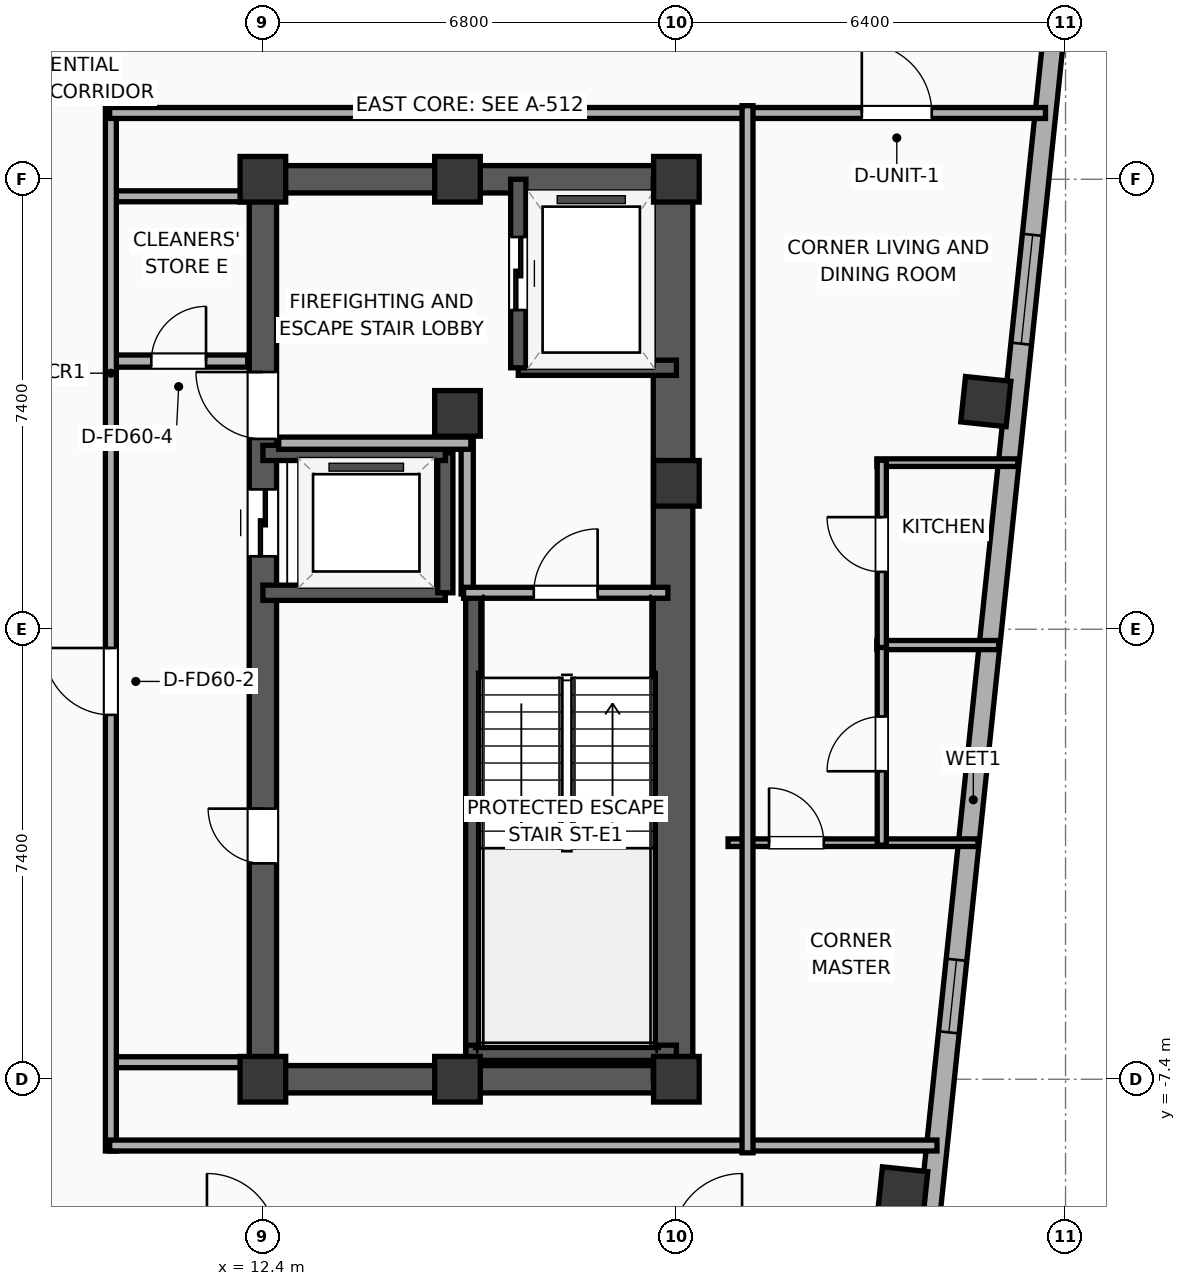
"""IFC4 building model, lengths in metres.
Left out: names, types, materials, properties, quantities, classifications, styles, units other than length and angle.
Written with IfcOpenShell. Run it as: python <this file> out.ifc"""

import sys

from ifc_helpers import new_model, si_unit, direction, frame, frame_2d, origin, origin_2d, place, context, subcontext, project, spatial, rectangle, hollow_rectangle, extrude, element, fill, save


model = new_model("IFC4")
c1 = context("Model", 3, precision=1e-05, world=origin(), true_north=direction((0.0, 1.0)))
c2 = subcontext(c1, "Body", "Model", "MODEL_VIEW")
j1 = project(units=[si_unit("LENGTHUNIT", "METRE"), si_unit("PLANEANGLEUNIT", "RADIAN")], contexts=[c1])
p1 = place(None, origin())
s1 = spatial("IfcSite", under=j1, at=p1, CompositionType="ELEMENT")
p2 = place(p1, origin())
s2 = spatial("IfcBuilding", under=s1, at=p2, CompositionType="ELEMENT")
p3 = place(p2, frame((0.0, 0.0, 260.0)))
s3 = spatial("IfcBuildingStorey", under=s2, at=p3, CompositionType="ELEMENT", Elevation=260.0)
for number, where, z_axis, x_axis in (
    (1, (12.4, -7.4, 0.0), (0.0, 0.0, 1.0), (1.0, 0.0, 0.0)),
    (2, (15.6, 3.55, 0.0), (0.0, 0.0, 1.0), (1.0, 0.0, 0.0)),
    (3, (12.4, 7.4, 0.0), (0.0, 0.0, 1.0), (1.0, 0.0, 0.0)),
    (4, (15.6, -7.4, 0.0), (0.0, 0.0, 1.0), (1.0, 0.0, 0.0)),
    (5, (15.6, 7.4, 0.0), (0.0, 0.0, 1.0), (1.0, 0.0, 0.0)),
    (6, (19.2, -7.4, 0.0), (0.0, 0.0, 1.0), (1.0, 0.0, 0.0)),
    (7, (19.2, 2.4, 0.0), (0.0, 0.0, 1.0), (1.0, 0.0, 0.0)),
    (8, (19.2, 7.4, 0.0), (0.0, 0.0, 1.0), (1.0, 0.0, 0.0)),
):
    element("IfcColumn", number, at=place(p3, frame(where, z_axis=z_axis, x_axis=x_axis)), inside=s3, PredefinedType="COLUMN", context=c2, shape_type="SweptSolid", body=[
        extrude(rectangle(XDim=0.75, YDim=0.75, at=origin_2d()), origin(), (0.0, 0.0, 1.0), 3.9),
    ])
for number, where, z_axis, x_axis in (
    (9, (12.175, -7.4, 0.0), (0.0, 0.0, 1.0), (1.0, 0.0, 0.0)),
    (10, (12.175, 7.4, 0.0), (0.0, 0.0, 1.0), (1.0, 0.0, 0.0)),
):
    element("IfcWall", number, at=place(p3, frame(where, z_axis=z_axis, x_axis=x_axis)), inside=s3, PredefinedType="SHEAR", context=c2, shape_type="SweptSolid", body=[
        extrude(rectangle(XDim=7.25, YDim=0.45, at=frame_2d((3.625, 0.0))), origin(), (0.0, 0.0, 1.0), 3.65),
    ])
p4 = place(p3, frame((12.4, -7.4, 0.0), z_axis=(0.0, 0.0, 1.0), x_axis=(0.0, 1.0, 0.0)))
e11 = element("IfcWall", 11, at=p4, inside=s3, PredefinedType="SHEAR", context=c2, shape_type="SweptSolid", body=[
    extrude(rectangle(XDim=14.8, YDim=0.45, at=frame_2d((7.4, 0.0))), origin(), (0.0, 0.0, 1.0), 3.65),
])
p5 = place(p4, frame((8.6, 0.0, 0.0)))
e12 = element("IfcOpeningElement", 12, at=p5, cuts=e11, PredefinedType="OPENING", context=c2, shape_type="SweptSolid", body=[
    extrude(rectangle(XDim=1.1, YDim=2.05, at=frame_2d((0.55, 1.025))), frame((0.0, 0.235, 0.0), z_axis=(0.0, -1.0, 0.0), x_axis=(1.0, 0.0, 0.0)), (0.0, 0.0, 1.0), 0.47),
])
p6 = place(p4, frame((10.53, 0.0, 0.0)))
e13 = element("IfcOpeningElement", 13, at=p6, cuts=e11, PredefinedType="OPENING", context=c2, shape_type="SweptSolid", body=[
    extrude(rectangle(XDim=1.1, YDim=2.05, at=frame_2d((0.55, 1.025))), frame((0.0, 0.235, 0.0), z_axis=(0.0, -1.0, 0.0), x_axis=(1.0, 0.0, 0.0)), (0.0, 0.0, 1.0), 0.47),
])
p7 = place(p4, frame((3.55, 0.0, 0.0)))
e14 = element("IfcOpeningElement", 14, at=p7, cuts=e11, PredefinedType="OPENING", context=c2, shape_type="SweptSolid", body=[
    extrude(rectangle(XDim=0.9, YDim=2.05, at=frame_2d((0.45, 1.025))), frame((0.0, 0.235, 0.0), z_axis=(0.0, -1.0, 0.0), x_axis=(1.0, 0.0, 0.0)), (0.0, 0.0, 1.0), 0.47),
])
p8 = place(p3, frame((19.145, -7.4, 0.0), z_axis=(0.0, 0.0, 1.0), x_axis=(0.0, 1.0, 0.0)))
e15 = element("IfcWall", 15, at=p8, inside=s3, PredefinedType="SHEAR", context=c2, shape_type="SweptSolid", body=[
    extrude(rectangle(XDim=14.8, YDim=0.65, at=frame_2d((7.4, 0.0))), origin(), (0.0, 0.0, 1.0), 3.65),
])
p9 = place(p3, frame((15.86, -7.085, 0.0), z_axis=(0.0, 0.0, 1.0), x_axis=(0.0, 1.0, 0.0)))
e16 = element("IfcWall", 16, at=p9, inside=s3, PredefinedType="SOLIDWALL", context=c2, shape_type="SweptSolid", body=[
    extrude(rectangle(XDim=7.685, YDim=0.25, at=frame_2d((3.843, 0.0))), origin(), (0.0, 0.0, 1.0), 3.65),
])
p10 = place(p3, frame((15.74, -6.965, 0.0), z_axis=(0.0, 0.0, 1.0), x_axis=(1.0, 0.0, 0.0)))
e17 = element("IfcWall", 17, at=p10, inside=s3, PredefinedType="SOLIDWALL", context=c2, shape_type="SweptSolid", body=[
    extrude(rectangle(XDim=3.46, YDim=0.25, at=frame_2d((1.73, 0.0))), origin(), (0.0, 0.0, 1.0), 3.65),
])
for number, where, z_axis, x_axis in (
    (18, (22.923, -9.252, 0.0), (0.0, 0.0, 1.0), (0.995, -0.105, 0.0)),
    (19, (24.289, 3.744, 0.0), (0.0, 0.0, 1.0), (0.995, -0.105, 0.0)),
):
    element("IfcColumn", number, at=place(p3, frame(where, z_axis=z_axis, x_axis=x_axis)), inside=s3, PredefinedType="COLUMN", context=c2, shape_type="SweptSolid", body=[
        extrude(hollow_rectangle(XDim=0.75, YDim=0.75, WallThickness=0.025, at=origin_2d()), origin(), (0.0, 0.0, 1.0), 3.9),
    ])
p11 = place(p3, frame((25.67, 12.296, 0.0), z_axis=(0.0, 0.0, 1.0), x_axis=(-0.104533282919, -0.994521388791, 0.0)))
e20 = element("IfcWall", 20, at=p11, inside=s3, PredefinedType="ELEMENTEDWALL", context=c2, shape_type="SweptSolid", body=[
    extrude(rectangle(XDim=30.366, YDim=0.34, at=frame_2d((15.183, 0.0))), origin(), (0.0, 0.0, 1.0), 2.54),
])
p12 = place(p11, frame((5.842, 0.0, 0.75)))
e21 = element("IfcOpeningElement", 21, at=p12, cuts=e20, PredefinedType="OPENING", context=c2, shape_type="SweptSolid", body=[
    extrude(rectangle(XDim=1.8, YDim=1.63, at=frame_2d((0.9, 0.815))), frame((0.0, 0.18, 0.0), z_axis=(0.0, -1.0, 0.0), x_axis=(1.0, 0.0, 0.0)), (0.0, 0.0, 1.0), 0.36),
])
p13 = place(p11, frame((23.525, 0.0, 0.75)))
e22 = element("IfcOpeningElement", 22, at=p13, cuts=e20, PredefinedType="OPENING", context=c2, shape_type="SweptSolid", body=[
    extrude(rectangle(XDim=1.8, YDim=1.63, at=frame_2d((0.9, 0.815))), frame((0.0, 0.18, 0.0), z_axis=(0.0, -1.0, 0.0), x_axis=(1.0, 0.0, 0.0)), (0.0, 0.0, 1.0), 0.36),
])
p14 = place(p11, frame((27.017, 0.0, 0.75)))
e23 = element("IfcOpeningElement", 23, at=p14, cuts=e20, PredefinedType="OPENING", context=c2, shape_type="SweptSolid", body=[
    extrude(rectangle(XDim=1.2, YDim=1.63, at=frame_2d((0.6, 0.815))), frame((0.0, 0.18, 0.0), z_axis=(0.0, -1.0, 0.0), x_axis=(1.0, 0.0, 0.0)), (0.0, 0.0, 1.0), 0.36),
])
p15 = place(p11, frame((17.829, 0.0, 0.75)))
e24 = element("IfcOpeningElement", 24, at=p15, cuts=e20, PredefinedType="OPENING", context=c2, shape_type="SweptSolid", body=[
    extrude(rectangle(XDim=1.2, YDim=1.63, at=frame_2d((0.6, 0.815))), frame((0.0, 0.18, 0.0), z_axis=(0.0, -1.0, 0.0), x_axis=(1.0, 0.0, 0.0)), (0.0, 0.0, 1.0), 0.36),
])
p16 = place(p3, frame((16.6, 4.3, 0.0), z_axis=(0.0, 0.0, 1.0), x_axis=(1.0, 0.0, 0.0)))
e25 = element("IfcWall", 25, at=p16, inside=s3, PredefinedType="SOLIDWALL", context=c2, shape_type="SweptSolid", body=[
    extrude(rectangle(XDim=2.6, YDim=0.25, at=frame_2d((1.3, 0.0))), origin(), (0.0, 0.0, 1.0), 3.65),
])
p17 = place(p3, frame((16.6, 7.4, 0.0), z_axis=(0.0, 0.0, 1.0), x_axis=(0.0, -1.0, 0.0)))
e26 = element("IfcWall", 26, at=p17, inside=s3, PredefinedType="SOLIDWALL", context=c2, shape_type="SweptSolid", body=[
    extrude(rectangle(XDim=3.1, YDim=0.25, at=frame_2d((1.55, 0.0))), origin(), (0.0, 0.0, 1.0), 3.65),
])
p18 = place(p17, frame((0.95, 0.0, 0.0)))
e27 = element("IfcOpeningElement", 27, at=p18, cuts=e26, PredefinedType="OPENING", context=c2, shape_type="SweptSolid", body=[
    extrude(rectangle(XDim=1.2, YDim=2.05, at=frame_2d((0.6, 1.025))), frame((0.0, 0.135, 0.0), z_axis=(0.0, -1.0, 0.0), x_axis=(1.0, 0.0, 0.0)), (0.0, 0.0, 1.0), 0.27),
])
p19 = place(p3, frame((12.4, 0.6, 0.0), z_axis=(0.0, 0.0, 1.0), x_axis=(1.0, 0.0, 0.0)))
e28 = element("IfcWall", 28, at=p19, inside=s3, PredefinedType="SOLIDWALL", context=c2, shape_type="SweptSolid", body=[
    extrude(rectangle(XDim=3.0, YDim=0.25, at=frame_2d((1.5, 0.0))), origin(), (0.0, 0.0, 1.0), 3.65),
])
p20 = place(p3, frame((15.4, 0.6, 0.0), z_axis=(0.0, 0.0, 1.0), x_axis=(0.0, 1.0, 0.0)))
e29 = element("IfcWall", 29, at=p20, inside=s3, PredefinedType="SOLIDWALL", context=c2, shape_type="SweptSolid", body=[
    extrude(rectangle(XDim=2.3, YDim=0.25, at=frame_2d((1.15, 0.0))), origin(), (0.0, 0.0, 1.0), 3.65),
])
p21 = place(p3, frame((15.4, 2.9, 0.0), z_axis=(0.0, 0.0, 1.0), x_axis=(-1.0, 0.0, 0.0)))
e30 = element("IfcWall", 30, at=p21, inside=s3, PredefinedType="SOLIDWALL", context=c2, shape_type="SweptSolid", body=[
    extrude(rectangle(XDim=3.0, YDim=0.25, at=frame_2d((1.5, 0.0))), origin(), (0.0, 0.0, 1.0), 3.65),
])
p22 = place(p3, frame((15.76, 0.58, 0.0), z_axis=(0.0, 0.0, 1.0), x_axis=(0.0, 1.0, 0.0)))
e31 = element("IfcWall", 31, at=p22, inside=s3, PredefinedType="PARTITIONING", context=c2, shape_type="SweptSolid", body=[
    extrude(rectangle(XDim=2.52, YDim=0.2, at=frame_2d((1.26, 0.0))), origin(), (0.0, 0.0, 1.0), 3.65),
])
p23 = place(p3, frame((12.66, 3.06, 0.0), z_axis=(0.0, 0.0, 1.0), x_axis=(1.0, 0.0, 0.0)))
e32 = element("IfcWall", 32, at=p23, inside=s3, PredefinedType="PARTITIONING", context=c2, shape_type="SweptSolid", body=[
    extrude(rectangle(XDim=3.16, YDim=0.2, at=frame_2d((1.58, 0.0))), origin(), (0.0, 0.0, 1.0), 3.65),
])
p24 = place(p3, frame((15.7, 0.6, 0.0), z_axis=(0.0, 0.0, 1.0), x_axis=(1.0, 0.0, 0.0)))
e33 = element("IfcWall", 33, at=p24, inside=s3, PredefinedType="PARTITIONING", context=c2, shape_type="SweptSolid", body=[
    extrude(rectangle(XDim=3.36, YDim=0.18, at=frame_2d((1.68, 0.0))), origin(), (0.0, 0.0, 1.0), 3.65),
])
p25 = place(p24, frame((1.155, 0.0, 0.0)))
e34 = element("IfcOpeningElement", 34, at=p25, cuts=e33, PredefinedType="OPENING", context=c2, shape_type="SweptSolid", body=[
    extrude(rectangle(XDim=1.05, YDim=2.05, at=frame_2d((0.525, 1.025))), frame((0.0, 0.1, 0.0), z_axis=(0.0, -1.0, 0.0), x_axis=(1.0, 0.0, 0.0)), (0.0, 0.0, 1.0), 0.2),
])
p26 = place(p3, frame((9.88, 4.41, 0.0), z_axis=(0.0, 0.0, 1.0), x_axis=(1.0, 0.0, 0.0)))
e35 = element("IfcWall", 35, at=p26, inside=s3, PredefinedType="PARTITIONING", context=c2, shape_type="SweptSolid", body=[
    extrude(rectangle(XDim=2.27, YDim=0.2, at=frame_2d((1.135, 0.0))), origin(), (0.0, 0.0, 1.0), 3.65),
])
p27 = place(p26, frame((0.685, 0.0, 0.0)))
e36 = element("IfcOpeningElement", 36, at=p27, cuts=e35, PredefinedType="OPENING", context=c2, shape_type="SweptSolid", body=[
    extrude(rectangle(XDim=0.9, YDim=2.05, at=frame_2d((0.45, 1.025))), frame((0.0, 0.11, 0.0), z_axis=(0.0, -1.0, 0.0), x_axis=(1.0, 0.0, 0.0)), (0.0, 0.0, 1.0), 0.22),
])
for number, where, z_axis, x_axis in (
    (37, (9.88, 7.12, 0.0), (0.0, 0.0, 1.0), (1.0, 0.0, 0.0)),
    (38, (9.88, -7.12, 0.0), (0.0, 0.0, 1.0), (1.0, 0.0, 0.0)),
):
    element("IfcWall", number, at=place(p3, frame(where, z_axis=z_axis, x_axis=x_axis)), inside=s3, PredefinedType="PARTITIONING", context=c2, shape_type="SweptSolid", body=[
        extrude(rectangle(XDim=2.27, YDim=0.18, at=frame_2d((1.135, 0.0))), origin(), (0.0, 0.0, 1.0), 3.65),
    ])
p28 = place(p3, frame((9.9, -8.58, 0.0), z_axis=(0.0, 0.0, 1.0), x_axis=(0.0, 1.0, 0.0)))
e39 = element("IfcWall", 39, at=p28, inside=s3, PredefinedType="PARTITIONING", context=c2, shape_type="SweptSolid", body=[
    extrude(rectangle(XDim=17.16, YDim=0.18, at=frame_2d((8.58, 0.0))), origin(), (0.0, 0.0, 1.0), 3.65),
])
p29 = place(p28, frame((7.172, 0.0, 0.0)))
e40 = element("IfcOpeningElement", 40, at=p29, cuts=e39, PredefinedType="OPENING", context=c2, shape_type="SweptSolid", body=[
    extrude(rectangle(XDim=1.1, YDim=2.05, at=frame_2d((0.55, 1.025))), frame((0.0, 0.1, 0.0), z_axis=(0.0, -1.0, 0.0), x_axis=(1.0, 0.0, 0.0)), (0.0, 0.0, 1.0), 0.2),
])
p30 = place(p3, frame((9.88, 8.49, 0.0), z_axis=(0.0, 0.0, 1.0), x_axis=(1.0, 0.0, 0.0)))
e41 = element("IfcWall", 41, at=p30, inside=s3, PredefinedType="PARTITIONING", context=c2, shape_type="SweptSolid", body=[
    extrude(rectangle(XDim=15.39, YDim=0.18, at=frame_2d((7.695, 0.0))), origin(), (0.0, 0.0, 1.0), 3.65),
])
p31 = place(p30, frame((12.37, 0.0, 0.0)))
e42 = element("IfcOpeningElement", 42, at=p31, cuts=e41, PredefinedType="OPENING", context=c2, shape_type="SweptSolid", body=[
    extrude(rectangle(XDim=1.15, YDim=2.05, at=frame_2d((0.575, 1.025))), frame((0.0, 0.1, 0.0), z_axis=(0.0, -1.0, 0.0), x_axis=(1.0, 0.0, 0.0)), (0.0, 0.0, 1.0), 0.2),
])
p32 = place(p3, frame((9.88, -8.49, 0.0), z_axis=(0.0, 0.0, 1.0), x_axis=(1.0, 0.0, 0.0)))
e43 = element("IfcWall", 43, at=p32, inside=s3, PredefinedType="PARTITIONING", context=c2, shape_type="SweptSolid", body=[
    extrude(rectangle(XDim=13.606, YDim=0.18, at=frame_2d((6.803, 0.0))), origin(), (0.0, 0.0, 1.0), 3.65),
])
p33 = place(p3, frame((22.498, 2.74, 0.0), z_axis=(0.0, 0.0, 1.0), x_axis=(1.0, 0.0, 0.0)))
e44 = element("IfcWall", 44, at=p33, inside=s3, PredefinedType="PARTITIONING", context=c2, shape_type="SweptSolid", body=[
    extrude(rectangle(XDim=2.319, YDim=0.125, at=frame_2d((1.159, 0.0))), origin(), (0.0, 0.0, 1.0), 3.65),
])
p34 = place(p3, frame((22.498, -0.26, 0.0), z_axis=(0.0, 0.0, 1.0), x_axis=(1.0, 0.0, 0.0)))
e45 = element("IfcWall", 45, at=p34, inside=s3, PredefinedType="PLUMBINGWALL", context=c2, shape_type="SweptSolid", body=[
    extrude(rectangle(XDim=2.003, YDim=0.15, at=frame_2d((1.001, 0.0))), origin(), (0.0, 0.0, 1.0), 3.65),
])
p35 = place(p3, frame((20.05, -3.51, 0.0), z_axis=(0.0, 0.0, 1.0), x_axis=(1.0, 0.0, 0.0)))
e46 = element("IfcWall", 46, at=p35, inside=s3, PredefinedType="PARTITIONING", context=c2, shape_type="SweptSolid", body=[
    extrude(rectangle(XDim=4.11, YDim=0.125, at=frame_2d((2.055, 0.0))), origin(), (0.0, 0.0, 1.0), 3.65),
])
p36 = place(p35, frame((0.674, 0.0, 0.0)))
e47 = element("IfcOpeningElement", 47, at=p36, cuts=e46, PredefinedType="OPENING", context=c2, shape_type="SweptSolid", body=[
    extrude(rectangle(XDim=0.9, YDim=2.05, at=frame_2d((0.45, 1.025))), frame((0.0, 0.073, 0.0), z_axis=(0.0, -1.0, 0.0), x_axis=(1.0, 0.0, 0.0)), (0.0, 0.0, 1.0), 0.145),
])
p37 = place(p3, frame((22.578, -3.55, 0.0), z_axis=(0.0, 0.0, 1.0), x_axis=(0.0, 1.0, 0.0)))
e48 = element("IfcWall", 48, at=p37, inside=s3, PredefinedType="PLUMBINGWALL", context=c2, shape_type="SweptSolid", body=[
    extrude(rectangle(XDim=3.33, YDim=0.15, at=frame_2d((1.665, 0.0))), origin(), (0.0, 0.0, 1.0), 3.65),
])
p38 = place(p37, frame((1.215, 0.0, 0.0)))
e49 = element("IfcOpeningElement", 49, at=p38, cuts=e48, PredefinedType="OPENING", context=c2, shape_type="SweptSolid", body=[
    extrude(rectangle(XDim=0.9, YDim=2.05, at=frame_2d((0.45, 1.025))), frame((0.0, 0.085, 0.0), z_axis=(0.0, -1.0, 0.0), x_axis=(1.0, 0.0, 0.0)), (0.0, 0.0, 1.0), 0.17),
])
p39 = place(p3, frame((22.578, -0.3, 0.0), z_axis=(0.0, 0.0, 1.0), x_axis=(0.0, 1.0, 0.0)))
e50 = element("IfcWall", 50, at=p39, inside=s3, PredefinedType="PLUMBINGWALL", context=c2, shape_type="SweptSolid", body=[
    extrude(rectangle(XDim=3.08, YDim=0.15, at=frame_2d((1.54, 0.0))), origin(), (0.0, 0.0, 1.0), 3.65),
])
p40 = place(p39, frame((1.244, 0.0, 0.0)))
e51 = element("IfcOpeningElement", 51, at=p40, cuts=e50, PredefinedType="OPENING", context=c2, shape_type="SweptSolid", body=[
    extrude(rectangle(XDim=0.9, YDim=2.05, at=frame_2d((0.45, 1.025))), frame((0.0, 0.085, 0.0), z_axis=(0.0, -1.0, 0.0), x_axis=(1.0, 0.0, 0.0)), (0.0, 0.0, 1.0), 0.17),
])
p41 = place(p3, frame((20.37, -8.61, 0.0), z_axis=(0.0, 0.0, 1.0), x_axis=(0.0, 1.0, 0.0)))
e52 = element("IfcWall", 52, at=p41, inside=s3, PredefinedType="PARTITIONING", context=c2, shape_type="SweptSolid", body=[
    extrude(rectangle(XDim=17.22, YDim=0.18, at=frame_2d((8.61, 0.0))), origin(), (0.0, 0.0, 1.0), 3.65),
])
p42 = place(p12, origin())
e53 = element("IfcWindow", 53, at=p42, inside=s3, PartitioningType="SINGLE_PANEL", PredefinedType="WINDOW", context=c2, shape_type="SweptSolid", body=[
    extrude(rectangle(XDim=1.8, YDim=1.63, at=frame_2d((0.9, 0.815))), frame((0.0, 0.03, 0.0), z_axis=(0.0, -1.0, 0.0), x_axis=(1.0, 0.0, 0.0)), (0.0, 0.0, 1.0), 0.06),
])
fill(e21, e53)
p43 = place(p15, origin())
e54 = element("IfcWindow", 54, at=p43, inside=s3, PartitioningType="SINGLE_PANEL", PredefinedType="WINDOW", context=c2, shape_type="SweptSolid", body=[
    extrude(rectangle(XDim=1.2, YDim=1.63, at=frame_2d((0.6, 0.815))), frame((0.0, 0.03, 0.0), z_axis=(0.0, -1.0, 0.0), x_axis=(1.0, 0.0, 0.0)), (0.0, 0.0, 1.0), 0.06),
])
fill(e24, e54)
p44 = place(p18, origin())
e55 = element("IfcDoor", 55, at=p44, inside=s3, OperationType="SLIDING_TO_LEFT", PredefinedType="DOOR", context=c2, shape_type="SweptSolid", body=[
    extrude(rectangle(XDim=1.2, YDim=2.05, at=frame_2d((0.6, 1.025))), frame((0.0, 0.025, 0.0), z_axis=(0.0, -1.0, 0.0), x_axis=(1.0, 0.0, 0.0)), (0.0, 0.0, 1.0), 0.05),
])
fill(e27, e55)
p45 = place(p5, origin())
e56 = element("IfcDoor", 56, at=p45, inside=s3, OperationType="SLIDING_TO_LEFT", PredefinedType="DOOR", context=c2, shape_type="SweptSolid", body=[
    extrude(rectangle(XDim=1.1, YDim=2.05, at=frame_2d((0.55, 1.025))), frame((0.0, 0.025, 0.0), z_axis=(0.0, -1.0, 0.0), x_axis=(1.0, 0.0, 0.0)), (0.0, 0.0, 1.0), 0.05),
])
fill(e12, e56)
p46 = place(p25, origin())
e57 = element("IfcDoor", 57, at=p46, inside=s3, OperationType="SINGLE_SWING_RIGHT", PredefinedType="DOOR", context=c2, shape_type="SweptSolid", body=[
    extrude(rectangle(XDim=1.05, YDim=2.05, at=frame_2d((0.525, 1.025))), frame((0.0, 0.025, 0.0), z_axis=(0.0, -1.0, 0.0), x_axis=(1.0, 0.0, 0.0)), (0.0, 0.0, 1.0), 0.05),
])
fill(e34, e57)
p47 = place(p27, origin())
e58 = element("IfcDoor", 58, at=p47, inside=s3, OperationType="SINGLE_SWING_RIGHT", PredefinedType="DOOR", context=c2, shape_type="SweptSolid", body=[
    extrude(rectangle(XDim=0.9, YDim=2.05, at=frame_2d((0.45, 1.025))), frame((0.0, 0.025, 0.0), z_axis=(0.0, -1.0, 0.0), x_axis=(1.0, 0.0, 0.0)), (0.0, 0.0, 1.0), 0.05),
])
fill(e36, e58)
p48 = place(p29, origin())
e59 = element("IfcDoor", 59, at=p48, inside=s3, OperationType="SINGLE_SWING_RIGHT", PredefinedType="DOOR", context=c2, shape_type="SweptSolid", body=[
    extrude(rectangle(XDim=1.1, YDim=2.05, at=frame_2d((0.55, 1.025))), frame((0.0, 0.025, 0.0), z_axis=(0.0, -1.0, 0.0), x_axis=(1.0, 0.0, 0.0)), (0.0, 0.0, 1.0), 0.05),
])
fill(e40, e59)
p49 = place(p31, origin())
e60 = element("IfcDoor", 60, at=p49, inside=s3, OperationType="SINGLE_SWING_LEFT", PredefinedType="DOOR", context=c2, shape_type="SweptSolid", body=[
    extrude(rectangle(XDim=1.15, YDim=2.05, at=frame_2d((0.575, 1.025))), frame((0.0, 0.025, 0.0), z_axis=(0.0, -1.0, 0.0), x_axis=(1.0, 0.0, 0.0)), (0.0, 0.0, 1.0), 0.05),
])
fill(e42, e60)
p50 = place(p36, origin())
e61 = element("IfcDoor", 61, at=p50, inside=s3, OperationType="SINGLE_SWING_LEFT", PredefinedType="DOOR", context=c2, shape_type="SweptSolid", body=[
    extrude(rectangle(XDim=0.9, YDim=2.05, at=frame_2d((0.45, 1.025))), frame((0.0, 0.025, 0.0), z_axis=(0.0, -1.0, 0.0), x_axis=(1.0, 0.0, 0.0)), (0.0, 0.0, 1.0), 0.05),
])
fill(e47, e61)
p51 = place(p38, origin())
e62 = element("IfcDoor", 62, at=p51, inside=s3, OperationType="SINGLE_SWING_LEFT", PredefinedType="DOOR", context=c2, shape_type="SweptSolid", body=[
    extrude(rectangle(XDim=0.9, YDim=2.05, at=frame_2d((0.45, 1.025))), frame((0.0, 0.025, 0.0), z_axis=(0.0, -1.0, 0.0), x_axis=(1.0, 0.0, 0.0)), (0.0, 0.0, 1.0), 0.05),
])
fill(e49, e62)
p52 = place(p40, origin())
e63 = element("IfcDoor", 63, at=p52, inside=s3, OperationType="SINGLE_SWING_RIGHT", PredefinedType="DOOR", context=c2, shape_type="SweptSolid", body=[
    extrude(rectangle(XDim=0.9, YDim=2.05, at=frame_2d((0.45, 1.025))), frame((0.0, 0.025, 0.0), z_axis=(0.0, -1.0, 0.0), x_axis=(1.0, 0.0, 0.0)), (0.0, 0.0, 1.0), 0.05),
])
fill(e51, e63)
p53 = place(p6, origin())
e64 = element("IfcDoor", 64, at=p53, inside=s3, OperationType="SINGLE_SWING_RIGHT", PredefinedType="DOOR", context=c2, shape_type="SweptSolid", body=[
    extrude(rectangle(XDim=1.1, YDim=2.05, at=frame_2d((0.55, 1.025))), frame((0.0, 0.025, 0.0), z_axis=(0.0, -1.0, 0.0), x_axis=(1.0, 0.0, 0.0)), (0.0, 0.0, 1.0), 0.05),
])
fill(e13, e64)
p54 = place(p7, origin())
e65 = element("IfcDoor", 65, at=p54, inside=s3, OperationType="SINGLE_SWING_RIGHT", PredefinedType="DOOR", context=c2, shape_type="SweptSolid", body=[
    extrude(rectangle(XDim=0.9, YDim=2.05, at=frame_2d((0.45, 1.025))), frame((0.0, 0.025, 0.0), z_axis=(0.0, -1.0, 0.0), x_axis=(1.0, 0.0, 0.0)), (0.0, 0.0, 1.0), 0.05),
])
fill(e14, e65)
save(model, sys.argv[1])
